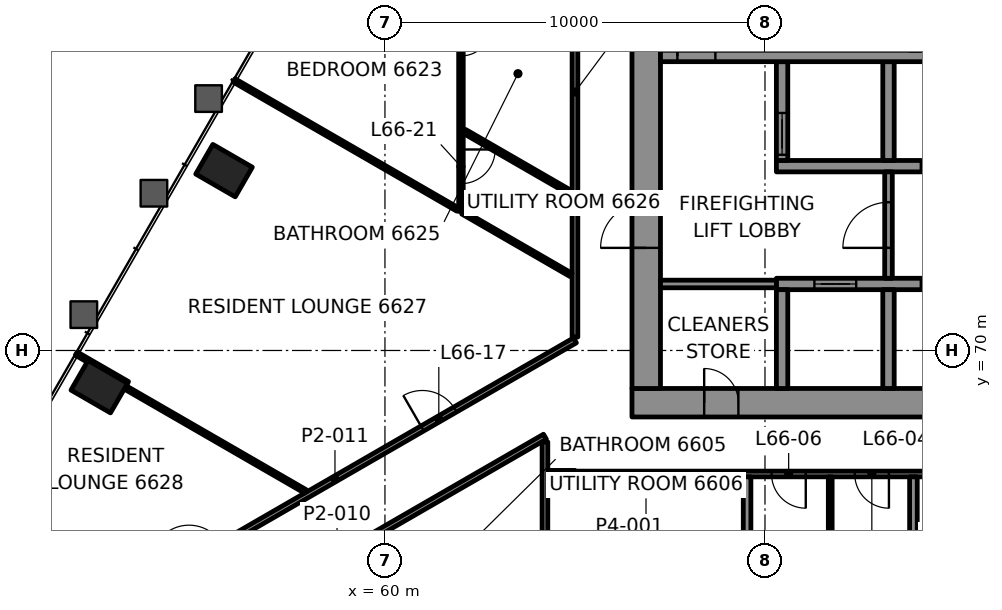
"""IFC4 building model, lengths in metres.
Left out: names, types, materials, properties, quantities, classifications, styles, units other than length and angle.
Written with IfcOpenShell. Run it as: python <this file> out.ifc"""

import sys

from ifc_helpers import new_model, si_unit, direction, frame, frame_2d, origin, origin_2d, place, context, subcontext, project, spatial, rectangle, hollow_rectangle, extrude, element, fill, save


model = new_model("IFC4")
c1 = context("Model", 3, precision=1e-05, world=origin(), true_north=direction((0.0, 1.0)))
c2 = subcontext(c1, "Body", "Model", "MODEL_VIEW")
j1 = project(units=[si_unit("LENGTHUNIT", "METRE"), si_unit("PLANEANGLEUNIT", "RADIAN")], contexts=[c1])
p1 = place(None, origin())
s1 = spatial("IfcSite", under=j1, at=p1, CompositionType="ELEMENT")
p2 = place(p1, origin())
s2 = spatial("IfcBuilding", under=s1, at=p2, CompositionType="ELEMENT")
p3 = place(p2, frame((0.0, 0.0, 277.6)))
s3 = spatial("IfcBuildingStorey", under=s2, at=p3, CompositionType="ELEMENT", Elevation=277.6)
for number, where, z_axis, x_axis in (
    (1, (55.766, 74.733, -0.0), (0.0, 0.0, 1.0), (-0.5, -0.866, 0.0)),
    (2, (52.483, 69.047, -0.0), (0.0, 0.0, 1.0), (-0.5, -0.866, 0.0)),
):
    element("IfcColumn", number, at=place(p3, frame(where, z_axis=z_axis, x_axis=x_axis)), inside=s3, PredefinedType="COLUMN", context=c2, shape_type="SweptSolid", body=[
        extrude(hollow_rectangle(XDim=0.9, YDim=1.2, WallThickness=0.06, at=origin_2d()), origin(), (0.0, 0.0, 1.0), 3.5),
    ])
p4 = place(p3, frame((66.5, 68.625, 0.0), z_axis=(0.0, 0.0, 1.0), x_axis=(1.0, 0.0, 0.0)))
e3 = element("IfcWall", 3, at=p4, inside=s3, PredefinedType="SHEAR", context=c2, shape_type="SweptSolid", body=[
    extrude(rectangle(XDim=17.0, YDim=0.75, at=frame_2d((8.5, 0.0))), origin(), (0.0, 0.0, 1.0), 3.3),
])
p5 = place(p4, frame((1.9, 0.0, 0.0)))
e4 = element("IfcOpeningElement", 4, at=p5, cuts=e3, PredefinedType="OPENING", context=c2, shape_type="SweptSolid", body=[
    extrude(rectangle(XDim=0.9, YDim=2.1, at=frame_2d((0.45, 1.05))), frame((0.0, 0.385, 0.0), z_axis=(0.0, -1.0, 0.0), x_axis=(1.0, 0.0, 0.0)), (0.0, 0.0, 1.0), 0.77),
])
p6 = place(p3, frame((66.875, 69.0, 0.0), z_axis=(0.0, 0.0, 1.0), x_axis=(0.0, 1.0, 0.0)))
e5 = element("IfcWall", 5, at=p6, inside=s3, PredefinedType="SHEAR", context=c2, shape_type="SweptSolid", body=[
    extrude(rectangle(XDim=12.0, YDim=0.75, at=frame_2d((6.0, 0.0))), origin(), (0.0, 0.0, 1.0), 3.3),
])
p7 = place(p6, frame((3.7, 0.0, 0.0)))
e6 = element("IfcOpeningElement", 6, at=p7, cuts=e5, PredefinedType="OPENING", context=c2, shape_type="SweptSolid", body=[
    extrude(rectangle(XDim=1.2, YDim=2.1, at=frame_2d((0.6, 1.05))), frame((0.0, 0.385, 0.0), z_axis=(0.0, -1.0, 0.0), x_axis=(1.0, 0.0, 0.0)), (0.0, 0.0, 1.0), 0.77),
])
p8 = place(p3, frame((70.3, 71.75, 0.0), z_axis=(0.0, 0.0, 1.0), x_axis=(1.0, 0.0, 0.0)))
e7 = element("IfcWall", 7, at=p8, inside=s3, PredefinedType="SHEAR", context=c2, shape_type="SweptSolid", body=[
    extrude(rectangle(XDim=11.5, YDim=0.3, at=frame_2d((5.75, 0.0))), origin(), (0.0, 0.0, 1.0), 3.3),
])
p9 = place(p8, frame((1.0, 0.0, 0.0)))
e8 = element("IfcOpeningElement", 8, at=p9, cuts=e7, PredefinedType="OPENING", context=c2, shape_type="SweptSolid", body=[
    extrude(rectangle(XDim=1.1, YDim=2.1, at=frame_2d((0.55, 1.05))), frame((0.0, 0.16, 0.0), z_axis=(0.0, -1.0, 0.0), x_axis=(1.0, 0.0, 0.0)), (0.0, 0.0, 1.0), 0.32),
])
p10 = place(p8, frame((3.8, 0.0, 0.0)))
e9 = element("IfcOpeningElement", 9, at=p10, cuts=e7, PredefinedType="OPENING", context=c2, shape_type="SweptSolid", body=[
    extrude(rectangle(XDim=1.1, YDim=2.1, at=frame_2d((0.55, 1.05))), frame((0.0, 0.16, 0.0), z_axis=(0.0, -1.0, 0.0), x_axis=(1.0, 0.0, 0.0)), (0.0, 0.0, 1.0), 0.32),
])
p11 = place(p8, frame((6.6, 0.0, 0.0)))
e10 = element("IfcOpeningElement", 10, at=p11, cuts=e7, PredefinedType="OPENING", context=c2, shape_type="SweptSolid", body=[
    extrude(rectangle(XDim=1.1, YDim=2.1, at=frame_2d((0.55, 1.05))), frame((0.0, 0.16, 0.0), z_axis=(0.0, -1.0, 0.0), x_axis=(1.0, 0.0, 0.0)), (0.0, 0.0, 1.0), 0.32),
])
p12 = place(p8, frame((9.4, 0.0, 0.0)))
e11 = element("IfcOpeningElement", 11, at=p12, cuts=e7, PredefinedType="OPENING", context=c2, shape_type="SweptSolid", body=[
    extrude(rectangle(XDim=1.1, YDim=2.1, at=frame_2d((0.55, 1.05))), frame((0.0, 0.16, 0.0), z_axis=(0.0, -1.0, 0.0), x_axis=(1.0, 0.0, 0.0)), (0.0, 0.0, 1.0), 0.32),
])
p13 = place(p3, frame((70.3, 74.85, 0.0), z_axis=(0.0, 0.0, 1.0), x_axis=(1.0, 0.0, 0.0)))
e12 = element("IfcWall", 12, at=p13, inside=s3, PredefinedType="SHEAR", context=c2, shape_type="SweptSolid", body=[
    extrude(rectangle(XDim=5.9, YDim=0.3, at=frame_2d((2.95, 0.0))), origin(), (0.0, 0.0, 1.0), 3.3),
])
p14 = place(p13, frame((3.8, 0.0, 0.0)))
e13 = element("IfcOpeningElement", 13, at=p14, cuts=e12, PredefinedType="OPENING", context=c2, shape_type="SweptSolid", body=[
    extrude(rectangle(XDim=1.1, YDim=2.1, at=frame_2d((0.55, 1.05))), frame((0.0, 0.16, 0.0), z_axis=(0.0, -1.0, 0.0), x_axis=(1.0, 0.0, 0.0)), (0.0, 0.0, 1.0), 0.32),
])
p15 = place(p3, frame((70.45, 69.0, 0.0), z_axis=(0.0, 0.0, 1.0), x_axis=(0.0, 1.0, 0.0)))
e14 = element("IfcWall", 14, at=p15, inside=s3, PredefinedType="SHEAR", context=c2, shape_type="SweptSolid", body=[
    extrude(rectangle(XDim=2.6, YDim=0.3, at=frame_2d((1.3, 0.0))), origin(), (0.0, 0.0, 1.0), 3.3),
])
p16 = place(p3, frame((70.45, 75.0, 0.0), z_axis=(0.0, 0.0, 1.0), x_axis=(0.0, 1.0, 0.0)))
e15 = element("IfcWall", 15, at=p16, inside=s3, PredefinedType="SHEAR", context=c2, shape_type="SweptSolid", body=[
    extrude(rectangle(XDim=2.6, YDim=0.3, at=frame_2d((1.3, 0.0))), origin(), (0.0, 0.0, 1.0), 3.3),
])
p17 = place(p16, frame((0.15, 0.0, 0.0)))
e16 = element("IfcOpeningElement", 16, at=p17, cuts=e15, PredefinedType="OPENING", context=c2, shape_type="SweptSolid", body=[
    extrude(rectangle(XDim=1.1, YDim=2.1, at=frame_2d((0.55, 1.05))), frame((0.0, 0.16, 0.0), z_axis=(0.0, -1.0, 0.0), x_axis=(1.0, 0.0, 0.0)), (0.0, 0.0, 1.0), 0.32),
])
for number, where, z_axis, x_axis in (
    (17, (73.25, 69.0, 0.0), (0.0, 0.0, 1.0), (0.0, 1.0, 0.0)),
    (18, (73.25, 75.0, 0.0), (0.0, 0.0, 1.0), (0.0, 1.0, 0.0)),
):
    element("IfcWall", number, at=place(p3, frame(where, z_axis=z_axis, x_axis=x_axis)), inside=s3, PredefinedType="SHEAR", context=c2, shape_type="SweptSolid", body=[
        extrude(rectangle(XDim=2.6, YDim=0.3, at=frame_2d((1.3, 0.0))), origin(), (0.0, 0.0, 1.0), 3.3),
    ])
p18 = place(p3, frame((67.25, 77.75, 0.0), z_axis=(0.0, 0.0, 1.0), x_axis=(1.0, 0.0, 0.0)))
e19 = element("IfcWall", 19, at=p18, inside=s3, PredefinedType="SHEAR", context=c2, shape_type="SweptSolid", body=[
    extrude(rectangle(XDim=15.5, YDim=0.3, at=frame_2d((7.75, 0.0))), origin(), (0.0, 0.0, 1.0), 3.3),
])
p19 = place(p18, frame((0.445, 0.0, 0.0)))
e20 = element("IfcOpeningElement", 20, at=p19, cuts=e19, PredefinedType="OPENING", context=c2, shape_type="SweptSolid", body=[
    extrude(rectangle(XDim=1.0, YDim=2.1, at=frame_2d((0.5, 1.05))), frame((0.0, 0.16, 0.0), z_axis=(0.0, -1.0, 0.0), x_axis=(1.0, 0.0, 0.0)), (0.0, 0.0, 1.0), 0.32),
])
p20 = place(p3, frame((85.0, 66.75, 0.0), z_axis=(0.0, 0.0, 1.0), x_axis=(-1.0, 0.0, 0.0)))
e21 = element("IfcWall", 21, at=p20, inside=s3, PredefinedType="PARTITIONING", context=c2, shape_type="SweptSolid", body=[
    extrude(rectangle(XDim=19.999, YDim=0.15, at=frame_2d((10.0, 0.0))), origin(), (0.0, 0.0, 1.0), 2.7),
])
p21 = place(p20, frame((2.96, 0.0, 0.0)))
e22 = element("IfcOpeningElement", 22, at=p21, cuts=e21, PredefinedType="OPENING", context=c2, shape_type="SweptSolid", body=[
    extrude(rectangle(XDim=1.0, YDim=2.1, at=frame_2d((0.5, 1.05))), frame((0.0, 0.085, 0.0), z_axis=(0.0, -1.0, 0.0), x_axis=(1.0, 0.0, 0.0)), (0.0, 0.0, 1.0), 0.17),
])
p22 = place(p20, frame((7.361, 0.0, 0.0)))
e23 = element("IfcOpeningElement", 23, at=p22, cuts=e21, PredefinedType="OPENING", context=c2, shape_type="SweptSolid", body=[
    extrude(rectangle(XDim=0.9, YDim=2.1, at=frame_2d((0.45, 1.05))), frame((0.0, 0.085, 0.0), z_axis=(0.0, -1.0, 0.0), x_axis=(1.0, 0.0, 0.0)), (0.0, 0.0, 1.0), 0.17),
])
p23 = place(p20, frame((9.55, 0.0, 0.0)))
e24 = element("IfcOpeningElement", 24, at=p23, cuts=e21, PredefinedType="OPENING", context=c2, shape_type="SweptSolid", body=[
    extrude(rectangle(XDim=0.9, YDim=2.1, at=frame_2d((0.45, 1.05))), frame((0.0, 0.085, 0.0), z_axis=(0.0, -1.0, 0.0), x_axis=(1.0, 0.0, 0.0)), (0.0, 0.0, 1.0), 0.17),
])
p24 = place(p20, frame((11.738, 0.0, 0.0)))
e25 = element("IfcOpeningElement", 25, at=p24, cuts=e21, PredefinedType="OPENING", context=c2, shape_type="SweptSolid", body=[
    extrude(rectangle(XDim=0.9, YDim=2.1, at=frame_2d((0.45, 1.05))), frame((0.0, 0.085, 0.0), z_axis=(0.0, -1.0, 0.0), x_axis=(1.0, 0.0, 0.0)), (0.0, 0.0, 1.0), 0.17),
])
p25 = place(p20, frame((13.926, 0.0, 0.0)))
e26 = element("IfcOpeningElement", 26, at=p25, cuts=e21, PredefinedType="OPENING", context=c2, shape_type="SweptSolid", body=[
    extrude(rectangle(XDim=0.9, YDim=2.1, at=frame_2d((0.45, 1.05))), frame((0.0, 0.085, 0.0), z_axis=(0.0, -1.0, 0.0), x_axis=(1.0, 0.0, 0.0)), (0.0, 0.0, 1.0), 0.17),
])
p26 = place(p3, frame((64.295, 66.769, 0.0), z_axis=(0.0, 0.0, 1.0), x_axis=(1.0, 0.0, 0.0)))
e27 = element("IfcWall", 27, at=p26, inside=s3, PredefinedType="PARTITIONING", context=c2, shape_type="SweptSolid", body=[
    extrude(rectangle(XDim=0.705, YDim=0.15, at=frame_2d((0.353, 0.0))), origin(), (0.0, 0.0, 1.0), 2.7),
])
p27 = place(p3, frame((64.21, 67.731, 0.0), z_axis=(0.0, 0.0, 1.0), x_axis=(-0.866027247007, -0.499996807431, 0.0)))
e28 = element("IfcWall", 28, at=p27, inside=s3, PredefinedType="PARTITIONING", context=c2, shape_type="SweptSolid", body=[
    extrude(rectangle(XDim=12.633, YDim=0.15, at=frame_2d((6.316, 0.0))), origin(), (0.0, 0.0, 1.0), 2.547),
])
p28 = place(p27, frame((8.143, 0.0, 0.0)))
e29 = element("IfcOpeningElement", 29, at=p28, cuts=e28, PredefinedType="OPENING", context=c2, shape_type="SweptSolid", body=[
    extrude(rectangle(XDim=1.0, YDim=2.1, at=frame_2d((0.5, 1.05))), frame((0.0, 0.085, 0.0), z_axis=(0.0, -1.0, 0.0), x_axis=(1.0, 0.0, 0.0)), (0.0, 0.0, 1.0), 0.17),
])
p29 = place(p3, frame((52.37, 62.974, 0.0), z_axis=(0.0, 0.0, 1.0), x_axis=(0.866025849409, 0.499999228155, 0.0)))
e30 = element("IfcWall", 30, at=p29, inside=s3, PredefinedType="PARTITIONING", context=c2, shape_type="SweptSolid", body=[
    extrude(rectangle(XDim=14.584, YDim=0.15, at=frame_2d((7.292, 0.0))), origin(), (0.0, 0.0, 1.0), 2.7),
])
p30 = place(p29, frame((2.858, 0.0, 0.0)))
e31 = element("IfcOpeningElement", 31, at=p30, cuts=e30, PredefinedType="OPENING", context=c2, shape_type="SweptSolid", body=[
    extrude(rectangle(XDim=1.0, YDim=2.1, at=frame_2d((0.5, 1.05))), frame((0.0, 0.085, 0.0), z_axis=(0.0, -1.0, 0.0), x_axis=(1.0, 0.0, 0.0)), (0.0, 0.0, 1.0), 0.17),
])
p31 = place(p29, frame((9.947, 0.0, 0.0)))
e32 = element("IfcOpeningElement", 32, at=p31, cuts=e30, PredefinedType="OPENING", context=c2, shape_type="SweptSolid", body=[
    extrude(rectangle(XDim=1.0, YDim=2.1, at=frame_2d((0.5, 1.05))), frame((0.0, 0.085, 0.0), z_axis=(0.0, -1.0, 0.0), x_axis=(1.0, 0.0, 0.0)), (0.0, 0.0, 1.0), 0.17),
])
p32 = place(p3, frame((73.906, 63.6, 0.0), z_axis=(0.0, 0.0, 1.0), x_axis=(0.0, 1.0, 0.0)))
e33 = element("IfcWall", 33, at=p32, inside=s3, PredefinedType="PARTITIONING", context=c2, shape_type="SweptSolid", body=[
    extrude(rectangle(XDim=3.075, YDim=0.2, at=frame_2d((1.538, 0.0))), origin(), (0.0, 0.0, 1.0), 2.7),
])
p33 = place(p3, frame((71.717, 63.6, 0.0), z_axis=(0.0, 0.0, 1.0), x_axis=(0.0, 1.0, 0.0)))
e34 = element("IfcWall", 34, at=p33, inside=s3, PredefinedType="PARTITIONING", context=c2, shape_type="SweptSolid", body=[
    extrude(rectangle(XDim=3.075, YDim=0.1, at=frame_2d((1.538, 0.0))), origin(), (0.0, 0.0, 1.0), 2.7),
])
p34 = place(p3, frame((69.529, 57.516, 0.0), z_axis=(0.0, 0.0, 1.0), x_axis=(0.0, 1.0, 0.0)))
e35 = element("IfcWall", 35, at=p34, inside=s3, PredefinedType="PARTITIONING", context=c2, shape_type="SweptSolid", body=[
    extrude(rectangle(XDim=9.159, YDim=0.2, at=frame_2d((4.579, 0.0))), origin(), (0.0, 0.0, 1.0), 2.688),
])
p35 = place(p3, frame((65.0, 70.352, 0.0), z_axis=(0.0, 0.0, 1.0), x_axis=(0.0, 1.0, 0.0)))
e36 = element("IfcWall", 36, at=p35, inside=s3, PredefinedType="PARTITIONING", context=c2, shape_type="SweptSolid", body=[
    extrude(rectangle(XDim=12.898, YDim=0.15, at=frame_2d((6.449, 0.0))), origin(), (0.0, 0.0, 1.0), 2.7),
])
p36 = place(p3, frame((64.21, 63.81, 0.0), z_axis=(0.0, 0.0, 1.0), x_axis=(0.0, 1.0, 0.0)))
e37 = element("IfcWall", 37, at=p36, inside=s3, PredefinedType="PARTITIONING", context=c2, shape_type="SweptSolid", body=[
    extrude(rectangle(XDim=3.784, YDim=0.15, at=frame_2d((1.892, 0.0))), origin(), (0.0, 0.0, 1.0), 2.547),
])
p37 = place(p3, frame((62.0, 85.776, 0.0), z_axis=(0.0, 0.0, 1.0), x_axis=(0.0, -1.0, 0.0)))
e38 = element("IfcWall", 38, at=p37, inside=s3, PredefinedType="PARTITIONING", context=c2, shape_type="SweptSolid", body=[
    extrude(rectangle(XDim=12.115, YDim=0.12, at=frame_2d((6.058, 0.0))), origin(), (0.0, 0.0, 1.0), 2.688),
])
p38 = place(p37, frame((7.226, 0.0, 0.0)))
e39 = element("IfcOpeningElement", 39, at=p38, cuts=e38, PredefinedType="OPENING", context=c2, shape_type="SweptSolid", body=[
    extrude(rectangle(XDim=0.8, YDim=2.1, at=frame_2d((0.4, 1.05))), frame((0.0, 0.07, 0.0), z_axis=(0.0, -1.0, 0.0), x_axis=(1.0, 0.0, 0.0)), (0.0, 0.0, 1.0), 0.14),
])
p39 = place(p37, frame((10.487, 0.0, 0.0)))
e40 = element("IfcOpeningElement", 40, at=p39, cuts=e38, PredefinedType="OPENING", context=c2, shape_type="SweptSolid", body=[
    extrude(rectangle(XDim=0.9, YDim=2.1, at=frame_2d((0.45, 1.05))), frame((0.0, 0.07, 0.0), z_axis=(0.0, -1.0, 0.0), x_axis=(1.0, 0.0, 0.0)), (0.0, 0.0, 1.0), 0.14),
])
p40 = place(p3, frame((64.891, 74.149, 0.0), z_axis=(0.0, 0.0, 1.0), x_axis=(-0.866019355129, 0.500010476433, 0.0)))
e41 = element("IfcWall", 41, at=p40, inside=s3, PredefinedType="PARTITIONING", context=c2, shape_type="SweptSolid", body=[
    extrude(rectangle(XDim=3.229, YDim=0.12, at=frame_2d((1.614, 0.0))), origin(), (0.0, 0.0, 1.0), 2.7),
])
p41 = place(p3, frame((64.899, 71.987, 0.0), z_axis=(0.0, 0.0, 1.0), x_axis=(-0.866032610133, 0.499987518031, 0.0)))
e42 = element("IfcWall", 42, at=p41, inside=s3, PredefinedType="PARTITIONING", context=c2, shape_type="SweptSolid", body=[
    extrude(rectangle(XDim=3.295, YDim=0.1, at=frame_2d((1.648, 0.0))), origin(), (0.0, 0.0, 1.0), 2.7),
])
p42 = place(p3, frame((53.228, 69.138, 0.0), z_axis=(0.0, 0.0, 1.0), x_axis=(-0.866018739521, 0.500011542666, 0.0)))
e43 = element("IfcWall", 43, at=p42, inside=s3, PredefinedType="PARTITIONING", context=c2, shape_type="SweptSolid", body=[
    extrude(rectangle(XDim=1.56, YDim=0.1, at=frame_2d((0.78, 0.0))), origin(), (0.0, 0.0, 1.0), 2.7),
])
p43 = place(p3, frame((57.91, 66.289, 0.0), z_axis=(0.0, 0.0, 1.0), x_axis=(-0.866026762963, 0.499997645826, 0.0)))
e44 = element("IfcWall", 44, at=p43, inside=s3, PredefinedType="PARTITIONING", context=c2, shape_type="SweptSolid", body=[
    extrude(rectangle(XDim=5.478, YDim=0.1, at=frame_2d((2.739, 0.0))), origin(), (0.0, 0.0, 1.0), 2.7),
])
p44 = place(p3, frame((61.915, 73.71, 0.0), z_axis=(0.0, 0.0, 1.0), x_axis=(-0.866024081565, 0.500002290144, 0.0)))
e45 = element("IfcWall", 45, at=p44, inside=s3, PredefinedType="PARTITIONING", context=c2, shape_type="SweptSolid", body=[
    extrude(rectangle(XDim=6.797, YDim=0.1, at=frame_2d((3.398, 0.0))), origin(), (0.0, 0.0, 1.0), 2.688),
])
p45 = place(p3, frame((67.25, 71.75, 0.0), z_axis=(0.0, 0.0, 1.0), x_axis=(1.0, 0.0, 0.0)))
e46 = element("IfcWall", 46, at=p45, inside=s3, PredefinedType="PARTITIONING", context=c2, shape_type="SweptSolid", body=[
    extrude(rectangle(XDim=3.05, YDim=0.2, at=frame_2d((1.525, 0.0))), origin(), (0.0, 0.0, 1.0), 3.3),
])
p46 = place(p3, frame((73.25, 71.9, 0.0), z_axis=(0.0, 0.0, 1.0), x_axis=(0.0, 1.0, 0.0)))
e47 = element("IfcWall", 47, at=p46, inside=s3, PredefinedType="PARTITIONING", context=c2, shape_type="SweptSolid", body=[
    extrude(rectangle(XDim=2.8, YDim=0.2, at=frame_2d((1.4, 0.0))), origin(), (0.0, 0.0, 1.0), 3.3),
])
p47 = place(p46, frame((0.8, 0.0, 0.0)))
e48 = element("IfcOpeningElement", 48, at=p47, cuts=e47, PredefinedType="OPENING", context=c2, shape_type="SweptSolid", body=[
    extrude(rectangle(XDim=1.2, YDim=2.1, at=frame_2d((0.6, 1.05))), frame((0.0, 0.11, 0.0), z_axis=(0.0, -1.0, 0.0), x_axis=(1.0, 0.0, 0.0)), (0.0, 0.0, 1.0), 0.22),
])
p48 = place(p24, origin())
e49 = element("IfcDoor", 49, at=p48, inside=s3, OperationType="SINGLE_SWING_RIGHT", PredefinedType="DOOR", context=c2, shape_type="SweptSolid", body=[
    extrude(rectangle(XDim=0.9, YDim=2.1, at=frame_2d((0.45, 1.05))), frame((0.0, 0.025, 0.0), z_axis=(0.0, -1.0, 0.0), x_axis=(1.0, 0.0, 0.0)), (0.0, 0.0, 1.0), 0.05),
])
fill(e25, e49)
p49 = place(p25, origin())
e50 = element("IfcDoor", 50, at=p49, inside=s3, OperationType="SINGLE_SWING_LEFT", PredefinedType="DOOR", context=c2, shape_type="SweptSolid", body=[
    extrude(rectangle(XDim=0.9, YDim=2.1, at=frame_2d((0.45, 1.05))), frame((0.0, 0.025, 0.0), z_axis=(0.0, -1.0, 0.0), x_axis=(1.0, 0.0, 0.0)), (0.0, 0.0, 1.0), 0.05),
])
fill(e26, e50)
p50 = place(p31, origin())
e51 = element("IfcDoor", 51, at=p50, inside=s3, OperationType="SINGLE_SWING_RIGHT", PredefinedType="DOOR", context=c2, shape_type="SweptSolid", body=[
    extrude(rectangle(XDim=1.0, YDim=2.1, at=frame_2d((0.5, 1.05))), frame((0.0, 0.025, 0.0), z_axis=(0.0, -1.0, 0.0), x_axis=(1.0, 0.0, 0.0)), (0.0, 0.0, 1.0), 0.05),
])
fill(e32, e51)
p51 = place(p38, origin())
e52 = element("IfcDoor", 52, at=p51, inside=s3, OperationType="SINGLE_SWING_RIGHT", PredefinedType="DOOR", context=c2, shape_type="SweptSolid", body=[
    extrude(rectangle(XDim=0.8, YDim=2.1, at=frame_2d((0.4, 1.05))), frame((0.0, 0.025, 0.0), z_axis=(0.0, -1.0, 0.0), x_axis=(1.0, 0.0, 0.0)), (0.0, 0.0, 1.0), 0.05),
])
fill(e39, e52)
p52 = place(p39, origin())
e53 = element("IfcDoor", 53, at=p52, inside=s3, OperationType="SINGLE_SWING_LEFT", PredefinedType="DOOR", context=c2, shape_type="SweptSolid", body=[
    extrude(rectangle(XDim=0.9, YDim=2.1, at=frame_2d((0.45, 1.05))), frame((0.0, 0.025, 0.0), z_axis=(0.0, -1.0, 0.0), x_axis=(1.0, 0.0, 0.0)), (0.0, 0.0, 1.0), 0.05),
])
fill(e40, e53)
p53 = place(p9, origin())
e54 = element("IfcDoor", 54, at=p53, inside=s3, OperationType="DOUBLE_DOOR_SLIDING", PredefinedType="DOOR", context=c2, shape_type="SweptSolid", body=[
    extrude(rectangle(XDim=1.1, YDim=2.1, at=frame_2d((0.55, 1.05))), frame((0.0, 0.025, 0.0), z_axis=(0.0, -1.0, 0.0), x_axis=(1.0, 0.0, 0.0)), (0.0, 0.0, 1.0), 0.05),
])
fill(e8, e54)
p54 = place(p10, origin())
e55 = element("IfcDoor", 55, at=p54, inside=s3, OperationType="DOUBLE_DOOR_SLIDING", PredefinedType="DOOR", context=c2, shape_type="SweptSolid", body=[
    extrude(rectangle(XDim=1.1, YDim=2.1, at=frame_2d((0.55, 1.05))), frame((0.0, 0.025, 0.0), z_axis=(0.0, -1.0, 0.0), x_axis=(1.0, 0.0, 0.0)), (0.0, 0.0, 1.0), 0.05),
])
fill(e9, e55)
p55 = place(p17, origin())
e56 = element("IfcDoor", 56, at=p55, inside=s3, OperationType="DOUBLE_DOOR_SLIDING", PredefinedType="DOOR", context=c2, shape_type="SweptSolid", body=[
    extrude(rectangle(XDim=1.1, YDim=2.1, at=frame_2d((0.55, 1.05))), frame((0.0, 0.025, 0.0), z_axis=(0.0, -1.0, 0.0), x_axis=(1.0, 0.0, 0.0)), (0.0, 0.0, 1.0), 0.05),
])
fill(e16, e56)
p56 = place(p14, origin())
e57 = element("IfcDoor", 57, at=p56, inside=s3, OperationType="DOUBLE_DOOR_SLIDING", PredefinedType="DOOR", context=c2, shape_type="SweptSolid", body=[
    extrude(rectangle(XDim=1.1, YDim=2.1, at=frame_2d((0.55, 1.05))), frame((0.0, 0.025, 0.0), z_axis=(0.0, -1.0, 0.0), x_axis=(1.0, 0.0, 0.0)), (0.0, 0.0, 1.0), 0.05),
])
fill(e13, e57)
p57 = place(p19, origin())
e58 = element("IfcDoor", 58, at=p57, inside=s3, OperationType="SINGLE_SWING_LEFT", PredefinedType="DOOR", context=c2, shape_type="SweptSolid", body=[
    extrude(rectangle(XDim=1.0, YDim=2.1, at=frame_2d((0.5, 1.05))), frame((0.0, 0.025, 0.0), z_axis=(0.0, -1.0, 0.0), x_axis=(1.0, 0.0, 0.0)), (0.0, 0.0, 1.0), 0.05),
])
fill(e20, e58)
p58 = place(p47, origin())
e59 = element("IfcDoor", 59, at=p58, inside=s3, OperationType="SINGLE_SWING_LEFT", PredefinedType="DOOR", context=c2, shape_type="SweptSolid", body=[
    extrude(rectangle(XDim=1.2, YDim=2.1, at=frame_2d((0.6, 1.05))), frame((0.0, 0.025, 0.0), z_axis=(0.0, -1.0, 0.0), x_axis=(1.0, 0.0, 0.0)), (0.0, 0.0, 1.0), 0.05),
])
fill(e48, e59)
p59 = place(p7, origin())
e60 = element("IfcDoor", 60, at=p59, inside=s3, OperationType="SINGLE_SWING_RIGHT", PredefinedType="DOOR", context=c2, shape_type="SweptSolid", body=[
    extrude(rectangle(XDim=1.2, YDim=2.1, at=frame_2d((0.6, 1.05))), frame((0.0, 0.095, 0.0), z_axis=(0.0, -1.0, 0.0), x_axis=(1.0, 0.0, 0.0)), (0.0, 0.0, 1.0), 0.19),
])
fill(e6, e60)
p60 = place(p5, origin())
e61 = element("IfcDoor", 61, at=p60, inside=s3, OperationType="SINGLE_SWING_RIGHT", PredefinedType="DOOR", context=c2, shape_type="SweptSolid", body=[
    extrude(rectangle(XDim=0.9, YDim=2.1, at=frame_2d((0.45, 1.05))), frame((0.0, 0.095, 0.0), z_axis=(0.0, -1.0, 0.0), x_axis=(1.0, 0.0, 0.0)), (0.0, 0.0, 1.0), 0.19),
])
fill(e4, e61)
save(model, sys.argv[1])
